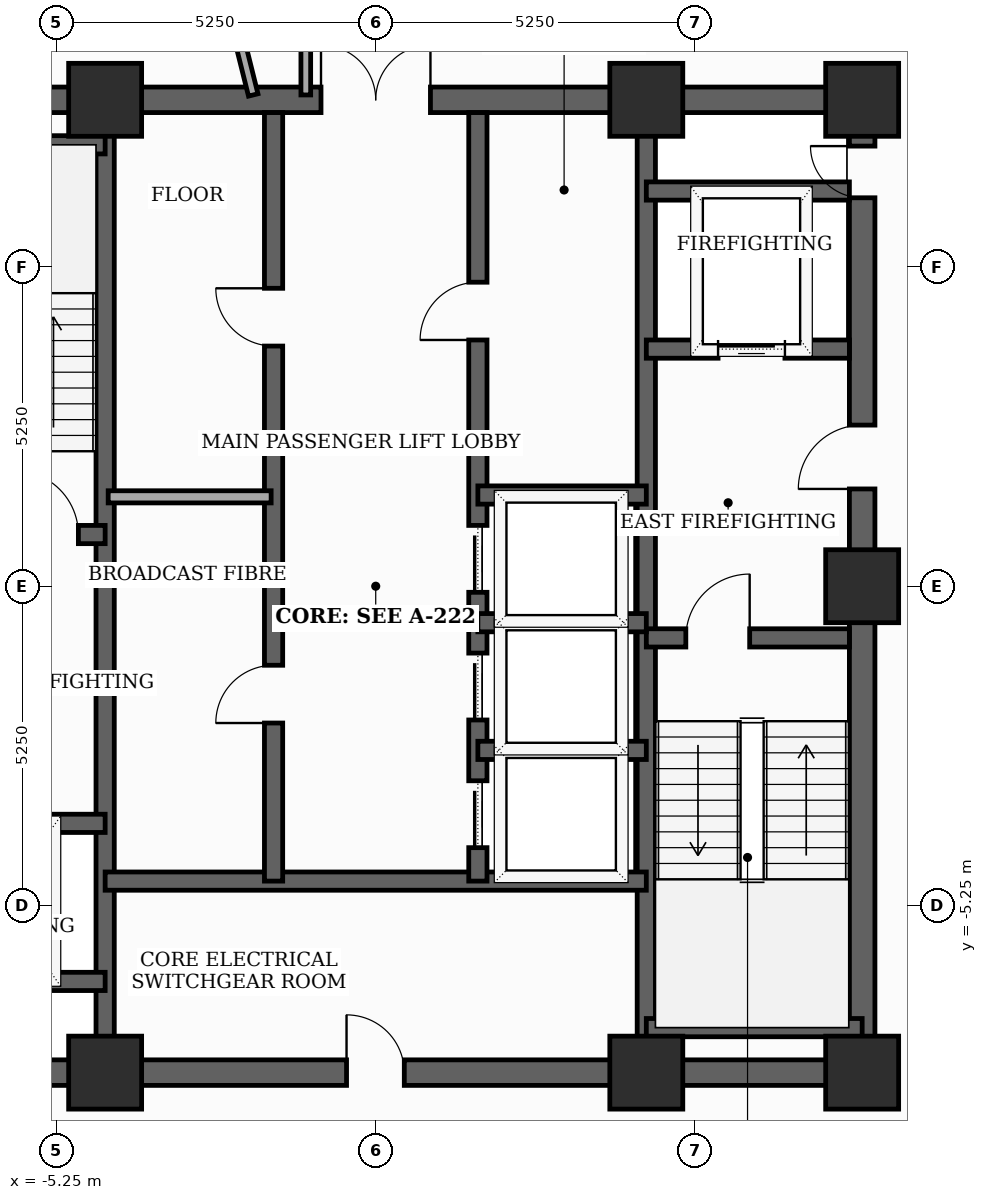
"""IFC4 building model, lengths in metres.
Left out: names, types, materials, properties, quantities, classifications, styles, units other than length and angle.
Written with IfcOpenShell. Run it as: python <this file> out.ifc"""

import sys

from ifc_helpers import new_model, si_unit, direction, frame, frame_2d, origin, origin_2d, place, context, subcontext, project, spatial, rectangle, extrude, element, fill, save


model = new_model("IFC4")
c1 = context("Model", 3, precision=1e-05, world=origin(), true_north=direction((0.0, 1.0)))
c2 = subcontext(c1, "Body", "Model", "MODEL_VIEW")
j1 = project(units=[si_unit("LENGTHUNIT", "METRE"), si_unit("PLANEANGLEUNIT", "RADIAN")], contexts=[c1])
p1 = place(None, origin())
s1 = spatial("IfcSite", under=j1, at=p1, CompositionType="ELEMENT")
p2 = place(p1, origin())
s2 = spatial("IfcBuilding", under=s1, at=p2, CompositionType="ELEMENT")
p3 = place(p2, frame((0.0, 0.0, 222.6)))
s3 = spatial("IfcBuildingStorey", under=s2, at=p3, CompositionType="ELEMENT", Elevation=222.6)
for number, where, z_axis, x_axis in (
    (1, (-4.45, -8.0, 0.0), (0.0, 0.0, 1.0), (1.0, 0.0, 0.0)),
    (2, (4.45, -8.0, 0.0), (0.0, 0.0, 1.0), (1.0, 0.0, 0.0)),
    (3, (8.0, -8.0, 0.0), (0.0, 0.0, 1.0), (1.0, 0.0, 0.0)),
    (4, (8.0, 0.0, 0.0), (0.0, 0.0, 1.0), (1.0, 0.0, 0.0)),
    (5, (8.0, 8.0, 0.0), (0.0, 0.0, 1.0), (1.0, 0.0, 0.0)),
    (6, (4.45, 8.0, 0.0), (0.0, 0.0, 1.0), (1.0, 0.0, 0.0)),
    (7, (-4.45, 8.0, 0.0), (0.0, 0.0, 1.0), (1.0, 0.0, 0.0)),
):
    element("IfcColumn", number, at=place(p3, frame(where, z_axis=z_axis, x_axis=x_axis)), inside=s3, PredefinedType="COLUMN", context=c2, shape_type="SweptSolid", body=[
        extrude(rectangle(XDim=1.2, YDim=1.2, at=origin_2d()), origin(), (0.0, 0.0, 1.0), 3.7),
    ])
p4 = place(p3, frame((8.0, -8.0, 0.0), z_axis=(0.0, 0.0, 1.0), x_axis=(0.0, 1.0, 0.0)))
e8 = element("IfcWall", 8, at=p4, inside=s3, PredefinedType="SHEAR", context=c2, shape_type="SweptSolid", body=[
    extrude(rectangle(XDim=16.0, YDim=0.42, at=frame_2d((8.0, 0.0))), origin(), (0.0, 0.0, 1.0), 3.5),
])
p5 = place(p4, frame((9.6, 0.0, 0.0)))
e9 = element("IfcOpeningElement", 9, at=p5, cuts=e8, PredefinedType="OPENING", context=c2, shape_type="SweptSolid", body=[
    extrude(rectangle(XDim=1.05, YDim=2.15, at=frame_2d((0.525, 1.075))), frame((0.0, 0.22, 0.0), z_axis=(0.0, -1.0, 0.0), x_axis=(1.0, 0.0, 0.0)), (0.0, 0.0, 1.0), 0.44),
])
p6 = place(p4, frame((14.389, 0.0, 0.0)))
e10 = element("IfcOpeningElement", 10, at=p6, cuts=e8, PredefinedType="OPENING", context=c2, shape_type="SweptSolid", body=[
    extrude(rectangle(XDim=0.85, YDim=2.02, at=frame_2d((0.425, 1.01))), frame((0.0, 0.22, 0.0), z_axis=(0.0, -1.0, 0.0), x_axis=(1.0, 0.0, 0.0)), (0.0, 0.0, 1.0), 0.44),
])
p7 = place(p3, frame((-8.0, -8.0, 0.0), z_axis=(0.0, 0.0, 1.0), x_axis=(1.0, 0.0, 0.0)))
e11 = element("IfcWall", 11, at=p7, inside=s3, PredefinedType="SHEAR", context=c2, shape_type="SweptSolid", body=[
    extrude(rectangle(XDim=16.0, YDim=0.42, at=frame_2d((8.0, 0.0))), origin(), (0.0, 0.0, 1.0), 3.5),
])
p8 = place(p7, frame((7.52, 0.0, 0.0)))
e12 = element("IfcOpeningElement", 12, at=p8, cuts=e11, PredefinedType="OPENING", context=c2, shape_type="SweptSolid", body=[
    extrude(rectangle(XDim=0.95, YDim=2.1, at=frame_2d((0.475, 1.05))), frame((0.0, 0.22, 0.0), z_axis=(0.0, -1.0, 0.0), x_axis=(1.0, 0.0, 0.0)), (0.0, 0.0, 1.0), 0.44),
])
p9 = place(p3, frame((-8.0, 8.0, 0.0), z_axis=(0.0, 0.0, 1.0), x_axis=(1.0, 0.0, 0.0)))
e13 = element("IfcWall", 13, at=p9, inside=s3, PredefinedType="SHEAR", context=c2, shape_type="SweptSolid", body=[
    extrude(rectangle(XDim=16.0, YDim=0.42, at=frame_2d((8.0, 0.0))), origin(), (0.0, 0.0, 1.0), 3.5),
])
p10 = place(p9, frame((7.1, 0.0, 0.0)))
e14 = element("IfcOpeningElement", 14, at=p10, cuts=e13, PredefinedType="OPENING", context=c2, shape_type="SweptSolid", body=[
    extrude(rectangle(XDim=1.8, YDim=2.15, at=frame_2d((0.9, 1.075))), frame((0.0, 0.22, 0.0), z_axis=(0.0, -1.0, 0.0), x_axis=(1.0, 0.0, 0.0)), (0.0, 0.0, 1.0), 0.44),
])
for number, where, z_axis, x_axis in (
    (15, (-4.45, -7.79, 0.0), (0.0, 0.0, 1.0), (0.0, 1.0, 0.0)),
    (16, (4.45, -7.79, 0.0), (0.0, 0.0, 1.0), (0.0, 1.0, 0.0)),
):
    element("IfcWall", number, at=place(p3, frame(where, z_axis=z_axis, x_axis=x_axis)), inside=s3, PredefinedType="SHEAR", context=c2, shape_type="SweptSolid", body=[
        extrude(rectangle(XDim=15.58, YDim=0.3, at=frame_2d((7.79, 0.0))), origin(), (0.0, 0.0, 1.0), 3.5),
    ])
p11 = place(p3, frame((-7.79, 0.85, 0.0), z_axis=(0.0, 0.0, 1.0), x_axis=(1.0, 0.0, 0.0)))
e17 = element("IfcWall", 17, at=p11, inside=s3, PredefinedType="SHEAR", context=c2, shape_type="SweptSolid", body=[
    extrude(rectangle(XDim=3.34, YDim=0.3, at=frame_2d((1.67, 0.0))), origin(), (0.0, 0.0, 1.0), 3.5),
])
p12 = place(p11, frame((1.85, 0.0, 0.0)))
e18 = element("IfcOpeningElement", 18, at=p12, cuts=e17, PredefinedType="OPENING", context=c2, shape_type="SweptSolid", body=[
    extrude(rectangle(XDim=1.05, YDim=2.15, at=frame_2d((0.525, 1.075))), frame((0.0, 0.16, 0.0), z_axis=(0.0, -1.0, 0.0), x_axis=(1.0, 0.0, 0.0)), (0.0, 0.0, 1.0), 0.32),
])
p13 = place(p3, frame((-7.79, 7.26, 0.0), z_axis=(0.0, 0.0, 1.0), x_axis=(1.0, 0.0, 0.0)))
e19 = element("IfcWall", 19, at=p13, inside=s3, PredefinedType="SHEAR", context=c2, shape_type="SweptSolid", body=[
    extrude(rectangle(XDim=3.34, YDim=0.3, at=frame_2d((1.67, 0.0))), origin(), (0.0, 0.0, 1.0), 3.5),
])
p14 = place(p3, frame((4.45, -0.85, 0.0), z_axis=(0.0, 0.0, 1.0), x_axis=(1.0, 0.0, 0.0)))
e20 = element("IfcWall", 20, at=p14, inside=s3, PredefinedType="SHEAR", context=c2, shape_type="SweptSolid", body=[
    extrude(rectangle(XDim=3.34, YDim=0.3, at=frame_2d((1.67, 0.0))), origin(), (0.0, 0.0, 1.0), 3.5),
])
p15 = place(p14, frame((0.65, 0.0, 0.0)))
e21 = element("IfcOpeningElement", 21, at=p15, cuts=e20, PredefinedType="OPENING", context=c2, shape_type="SweptSolid", body=[
    extrude(rectangle(XDim=1.05, YDim=2.15, at=frame_2d((0.525, 1.075))), frame((0.0, 0.16, 0.0), z_axis=(0.0, -1.0, 0.0), x_axis=(1.0, 0.0, 0.0)), (0.0, 0.0, 1.0), 0.32),
])
p16 = place(p3, frame((4.45, -7.26, 0.0), z_axis=(0.0, 0.0, 1.0), x_axis=(1.0, 0.0, 0.0)))
e22 = element("IfcWall", 22, at=p16, inside=s3, PredefinedType="SHEAR", context=c2, shape_type="SweptSolid", body=[
    extrude(rectangle(XDim=3.55, YDim=0.3, at=frame_2d((1.775, 0.0))), origin(), (0.0, 0.0, 1.0), 3.5),
])
p17 = place(p3, frame((-7.79, -3.9, 0.0), z_axis=(0.0, 0.0, 1.0), x_axis=(1.0, 0.0, 0.0)))
e23 = element("IfcWall", 23, at=p17, inside=s3, PredefinedType="SHEAR", context=c2, shape_type="SweptSolid", body=[
    extrude(rectangle(XDim=3.34, YDim=0.3, at=frame_2d((1.67, 0.0))), origin(), (0.0, 0.0, 1.0), 3.5),
])
p18 = place(p17, frame((1.27, 0.0, 0.0)))
e24 = element("IfcOpeningElement", 24, at=p18, cuts=e23, PredefinedType="OPENING", context=c2, shape_type="SweptSolid", body=[
    extrude(rectangle(XDim=1.1, YDim=2.1, at=frame_2d((0.55, 1.05))), frame((0.0, 0.16, 0.0), z_axis=(0.0, -1.0, 0.0), x_axis=(1.0, 0.0, 0.0)), (0.0, 0.0, 1.0), 0.32),
])
p19 = place(p3, frame((-7.79, -6.5, 0.0), z_axis=(0.0, 0.0, 1.0), x_axis=(1.0, 0.0, 0.0)))
e25 = element("IfcWall", 25, at=p19, inside=s3, PredefinedType="SHEAR", context=c2, shape_type="SweptSolid", body=[
    extrude(rectangle(XDim=3.34, YDim=0.3, at=frame_2d((1.67, 0.0))), origin(), (0.0, 0.0, 1.0), 3.5),
])
p20 = place(p3, frame((4.45, 3.9, 0.0), z_axis=(0.0, 0.0, 1.0), x_axis=(1.0, 0.0, 0.0)))
e26 = element("IfcWall", 26, at=p20, inside=s3, PredefinedType="SHEAR", context=c2, shape_type="SweptSolid", body=[
    extrude(rectangle(XDim=3.34, YDim=0.3, at=frame_2d((1.67, 0.0))), origin(), (0.0, 0.0, 1.0), 3.5),
])
p21 = place(p20, frame((1.18, 0.0, 0.0)))
e27 = element("IfcOpeningElement", 27, at=p21, cuts=e26, PredefinedType="OPENING", context=c2, shape_type="SweptSolid", body=[
    extrude(rectangle(XDim=1.1, YDim=2.1, at=frame_2d((0.55, 1.05))), frame((0.0, 0.16, 0.0), z_axis=(0.0, -1.0, 0.0), x_axis=(1.0, 0.0, 0.0)), (0.0, 0.0, 1.0), 0.32),
])
p22 = place(p3, frame((4.45, 6.5, 0.0), z_axis=(0.0, 0.0, 1.0), x_axis=(1.0, 0.0, 0.0)))
e28 = element("IfcWall", 28, at=p22, inside=s3, PredefinedType="SHEAR", context=c2, shape_type="SweptSolid", body=[
    extrude(rectangle(XDim=3.34, YDim=0.3, at=frame_2d((1.67, 0.0))), origin(), (0.0, 0.0, 1.0), 3.5),
])
p23 = place(p3, frame((-4.45, -4.85, 0.0), z_axis=(0.0, 0.0, 1.0), x_axis=(1.0, 0.0, 0.0)))
e29 = element("IfcWall", 29, at=p23, inside=s3, PredefinedType="SHEAR", context=c2, shape_type="SweptSolid", body=[
    extrude(rectangle(XDim=8.9, YDim=0.3, at=frame_2d((4.45, 0.0))), origin(), (0.0, 0.0, 1.0), 3.5),
])
p24 = place(p3, frame((-1.68, -4.85, 0.0), z_axis=(0.0, 0.0, 1.0), x_axis=(0.0, 1.0, 0.0)))
e30 = element("IfcWall", 30, at=p24, inside=s3, PredefinedType="SHEAR", context=c2, shape_type="SweptSolid", body=[
    extrude(rectangle(XDim=12.64, YDim=0.3, at=frame_2d((6.32, 0.0))), origin(), (0.0, 0.0, 1.0), 3.5),
])
p25 = place(p24, frame((2.6, 0.0, 0.0)))
e31 = element("IfcOpeningElement", 31, at=p25, cuts=e30, PredefinedType="OPENING", context=c2, shape_type="SweptSolid", body=[
    extrude(rectangle(XDim=0.95, YDim=2.1, at=frame_2d((0.475, 1.05))), frame((0.0, 0.16, 0.0), z_axis=(0.0, -1.0, 0.0), x_axis=(1.0, 0.0, 0.0)), (0.0, 0.0, 1.0), 0.32),
])
p26 = place(p24, frame((8.8, 0.0, 0.0)))
e32 = element("IfcOpeningElement", 32, at=p26, cuts=e30, PredefinedType="OPENING", context=c2, shape_type="SweptSolid", body=[
    extrude(rectangle(XDim=0.95, YDim=2.1, at=frame_2d((0.475, 1.05))), frame((0.0, 0.16, 0.0), z_axis=(0.0, -1.0, 0.0), x_axis=(1.0, 0.0, 0.0)), (0.0, 0.0, 1.0), 0.32),
])
p27 = place(p3, frame((1.68, -4.85, 0.0), z_axis=(0.0, 0.0, 1.0), x_axis=(0.0, 1.0, 0.0)))
e33 = element("IfcWall", 33, at=p27, inside=s3, PredefinedType="SHEAR", context=c2, shape_type="SweptSolid", body=[
    extrude(rectangle(XDim=12.64, YDim=0.3, at=frame_2d((6.32, 0.0))), origin(), (0.0, 0.0, 1.0), 3.5),
])
p28 = place(p27, frame((0.55, 0.0, 0.0)))
e34 = element("IfcOpeningElement", 34, at=p28, cuts=e33, PredefinedType="OPENING", context=c2, shape_type="SweptSolid", body=[
    extrude(rectangle(XDim=1.1, YDim=2.1, at=frame_2d((0.55, 1.05))), frame((0.0, 0.16, 0.0), z_axis=(0.0, -1.0, 0.0), x_axis=(1.0, 0.0, 0.0)), (0.0, 0.0, 1.0), 0.32),
])
p29 = place(p27, frame((2.65, 0.0, 0.0)))
e35 = element("IfcOpeningElement", 35, at=p29, cuts=e33, PredefinedType="OPENING", context=c2, shape_type="SweptSolid", body=[
    extrude(rectangle(XDim=1.1, YDim=2.1, at=frame_2d((0.55, 1.05))), frame((0.0, 0.16, 0.0), z_axis=(0.0, -1.0, 0.0), x_axis=(1.0, 0.0, 0.0)), (0.0, 0.0, 1.0), 0.32),
])
p30 = place(p27, frame((4.75, 0.0, 0.0)))
e36 = element("IfcOpeningElement", 36, at=p30, cuts=e33, PredefinedType="OPENING", context=c2, shape_type="SweptSolid", body=[
    extrude(rectangle(XDim=1.1, YDim=2.1, at=frame_2d((0.55, 1.05))), frame((0.0, 0.16, 0.0), z_axis=(0.0, -1.0, 0.0), x_axis=(1.0, 0.0, 0.0)), (0.0, 0.0, 1.0), 0.32),
])
p31 = place(p27, frame((8.9, 0.0, 0.0)))
e37 = element("IfcOpeningElement", 37, at=p31, cuts=e33, PredefinedType="OPENING", context=c2, shape_type="SweptSolid", body=[
    extrude(rectangle(XDim=0.95, YDim=2.1, at=frame_2d((0.475, 1.05))), frame((0.0, 0.16, 0.0), z_axis=(0.0, -1.0, 0.0), x_axis=(1.0, 0.0, 0.0)), (0.0, 0.0, 1.0), 0.32),
])
for number, where, z_axis, x_axis in (
    (38, (1.68, 1.5, 0.0), (0.0, 0.0, 1.0), (1.0, 0.0, 0.0)),
    (39, (1.68, -2.7, 0.0), (0.0, 0.0, 1.0), (1.0, 0.0, 0.0)),
    (40, (1.68, -0.6, 0.0), (0.0, 0.0, 1.0), (1.0, 0.0, 0.0)),
):
    element("IfcWall", number, at=place(p3, frame(where, z_axis=z_axis, x_axis=x_axis)), inside=s3, PredefinedType="SHEAR", context=c2, shape_type="SweptSolid", body=[
        extrude(rectangle(XDim=2.77, YDim=0.3, at=frame_2d((1.385, 0.0))), origin(), (0.0, 0.0, 1.0), 3.5),
    ])
p32 = place(p3, frame((-4.4, 1.47, 0.0), z_axis=(0.0, 0.0, 1.0), x_axis=(1.0, 0.0, 0.0)))
e41 = element("IfcWall", 41, at=p32, inside=s3, PredefinedType="SOLIDWALL", context=c2, shape_type="SweptSolid", body=[
    extrude(rectangle(XDim=2.68, YDim=0.2, at=frame_2d((1.34, 0.0))), origin(), (0.0, 0.0, 1.0), 3.5),
])
p33 = place(p3, frame((-1.15, 10.65, 0.0), z_axis=(0.0, 0.0, 1.0), x_axis=(0.0, -1.0, 0.0)))
e42 = element("IfcWall", 42, at=p33, inside=s3, PredefinedType="PARTITIONING", context=c2, shape_type="SweptSolid", body=[
    extrude(rectangle(XDim=2.57, YDim=0.16, at=frame_2d((1.285, 0.0))), origin(), (0.0, 0.0, 1.0), 2.885),
])
p34 = place(p3, frame((-3.803, 15.255, 0.0), z_axis=(0.0, 0.0, 1.0), x_axis=(0.241851911951, -0.970313172479, 0.0)))
e43 = element("IfcWall", 43, at=p34, inside=s3, PredefinedType="PARTITIONING", context=c2, shape_type="SweptSolid", body=[
    extrude(rectangle(XDim=7.394, YDim=0.16, at=frame_2d((3.697, 0.0))), origin(), (0.0, 0.0, 1.0), 2.885),
])
p35 = place(p5, origin())
e44 = element("IfcDoor", 44, at=p35, inside=s3, OperationType="SINGLE_SWING_LEFT", PredefinedType="DOOR", context=c2, shape_type="SweptSolid", body=[
    extrude(rectangle(XDim=1.05, YDim=2.15, at=frame_2d((0.525, 1.075))), frame((0.0, 0.025, 0.0), z_axis=(0.0, -1.0, 0.0), x_axis=(1.0, 0.0, 0.0)), (0.0, 0.0, 1.0), 0.05),
])
fill(e9, e44)
p36 = place(p6, origin())
e45 = element("IfcDoor", 45, at=p36, inside=s3, OperationType="SINGLE_SWING_RIGHT", PredefinedType="TRAPDOOR", context=c2, shape_type="SweptSolid", body=[
    extrude(rectangle(XDim=0.85, YDim=2.02, at=frame_2d((0.425, 1.01))), frame((0.0, 0.025, 0.0), z_axis=(0.0, -1.0, 0.0), x_axis=(1.0, 0.0, 0.0)), (0.0, 0.0, 1.0), 0.05),
])
fill(e10, e45)
p37 = place(p8, origin())
e46 = element("IfcDoor", 46, at=p37, inside=s3, OperationType="SINGLE_SWING_LEFT", PredefinedType="DOOR", context=c2, shape_type="SweptSolid", body=[
    extrude(rectangle(XDim=0.95, YDim=2.1, at=frame_2d((0.475, 1.05))), frame((0.0, 0.025, 0.0), z_axis=(0.0, -1.0, 0.0), x_axis=(1.0, 0.0, 0.0)), (0.0, 0.0, 1.0), 0.05),
])
fill(e12, e46)
p38 = place(p10, origin())
e47 = element("IfcDoor", 47, at=p38, inside=s3, OperationType="DOUBLE_DOOR_SINGLE_SWING", PredefinedType="DOOR", context=c2, shape_type="SweptSolid", body=[
    extrude(rectangle(XDim=1.8, YDim=2.15, at=frame_2d((0.9, 1.075))), frame((0.0, 0.025, 0.0), z_axis=(0.0, -1.0, 0.0), x_axis=(1.0, 0.0, 0.0)), (0.0, 0.0, 1.0), 0.05),
])
fill(e14, e47)
p39 = place(p12, origin())
e48 = element("IfcDoor", 48, at=p39, inside=s3, OperationType="SINGLE_SWING_LEFT", PredefinedType="DOOR", context=c2, shape_type="SweptSolid", body=[
    extrude(rectangle(XDim=1.05, YDim=2.15, at=frame_2d((0.525, 1.075))), frame((0.0, 0.025, 0.0), z_axis=(0.0, -1.0, 0.0), x_axis=(1.0, 0.0, 0.0)), (0.0, 0.0, 1.0), 0.05),
])
fill(e18, e48)
p40 = place(p15, origin())
e49 = element("IfcDoor", 49, at=p40, inside=s3, OperationType="SINGLE_SWING_RIGHT", PredefinedType="DOOR", context=c2, shape_type="SweptSolid", body=[
    extrude(rectangle(XDim=1.05, YDim=2.15, at=frame_2d((0.525, 1.075))), frame((0.0, 0.025, 0.0), z_axis=(0.0, -1.0, 0.0), x_axis=(1.0, 0.0, 0.0)), (0.0, 0.0, 1.0), 0.05),
])
fill(e21, e49)
p41 = place(p21, origin())
e50 = element("IfcDoor", 50, at=p41, inside=s3, OperationType="SLIDING_TO_LEFT", PredefinedType="DOOR", context=c2, shape_type="SweptSolid", body=[
    extrude(rectangle(XDim=1.1, YDim=2.1, at=frame_2d((0.55, 1.05))), frame((0.0, 0.025, 0.0), z_axis=(0.0, -1.0, 0.0), x_axis=(1.0, 0.0, 0.0)), (0.0, 0.0, 1.0), 0.05),
])
fill(e27, e50)
p42 = place(p25, origin())
e51 = element("IfcDoor", 51, at=p42, inside=s3, OperationType="SINGLE_SWING_LEFT", PredefinedType="DOOR", context=c2, shape_type="SweptSolid", body=[
    extrude(rectangle(XDim=0.95, YDim=2.1, at=frame_2d((0.475, 1.05))), frame((0.0, 0.025, 0.0), z_axis=(0.0, -1.0, 0.0), x_axis=(1.0, 0.0, 0.0)), (0.0, 0.0, 1.0), 0.05),
])
fill(e31, e51)
p43 = place(p26, origin())
e52 = element("IfcDoor", 52, at=p43, inside=s3, OperationType="SINGLE_SWING_RIGHT", PredefinedType="DOOR", context=c2, shape_type="SweptSolid", body=[
    extrude(rectangle(XDim=0.95, YDim=2.1, at=frame_2d((0.475, 1.05))), frame((0.0, 0.025, 0.0), z_axis=(0.0, -1.0, 0.0), x_axis=(1.0, 0.0, 0.0)), (0.0, 0.0, 1.0), 0.05),
])
fill(e32, e52)
p44 = place(p28, origin())
e53 = element("IfcDoor", 53, at=p44, inside=s3, OperationType="SLIDING_TO_LEFT", PredefinedType="DOOR", context=c2, shape_type="SweptSolid", body=[
    extrude(rectangle(XDim=1.1, YDim=2.1, at=frame_2d((0.55, 1.05))), frame((0.0, 0.025, 0.0), z_axis=(0.0, -1.0, 0.0), x_axis=(1.0, 0.0, 0.0)), (0.0, 0.0, 1.0), 0.05),
])
fill(e34, e53)
p45 = place(p29, origin())
e54 = element("IfcDoor", 54, at=p45, inside=s3, OperationType="SLIDING_TO_LEFT", PredefinedType="DOOR", context=c2, shape_type="SweptSolid", body=[
    extrude(rectangle(XDim=1.1, YDim=2.1, at=frame_2d((0.55, 1.05))), frame((0.0, 0.025, 0.0), z_axis=(0.0, -1.0, 0.0), x_axis=(1.0, 0.0, 0.0)), (0.0, 0.0, 1.0), 0.05),
])
fill(e35, e54)
p46 = place(p30, origin())
e55 = element("IfcDoor", 55, at=p46, inside=s3, OperationType="SLIDING_TO_LEFT", PredefinedType="DOOR", context=c2, shape_type="SweptSolid", body=[
    extrude(rectangle(XDim=1.1, YDim=2.1, at=frame_2d((0.55, 1.05))), frame((0.0, 0.025, 0.0), z_axis=(0.0, -1.0, 0.0), x_axis=(1.0, 0.0, 0.0)), (0.0, 0.0, 1.0), 0.05),
])
fill(e36, e55)
p47 = place(p31, origin())
e56 = element("IfcDoor", 56, at=p47, inside=s3, OperationType="SINGLE_SWING_LEFT", PredefinedType="DOOR", context=c2, shape_type="SweptSolid", body=[
    extrude(rectangle(XDim=0.95, YDim=2.1, at=frame_2d((0.475, 1.05))), frame((0.0, 0.025, 0.0), z_axis=(0.0, -1.0, 0.0), x_axis=(1.0, 0.0, 0.0)), (0.0, 0.0, 1.0), 0.05),
])
fill(e37, e56)
save(model, sys.argv[1])
